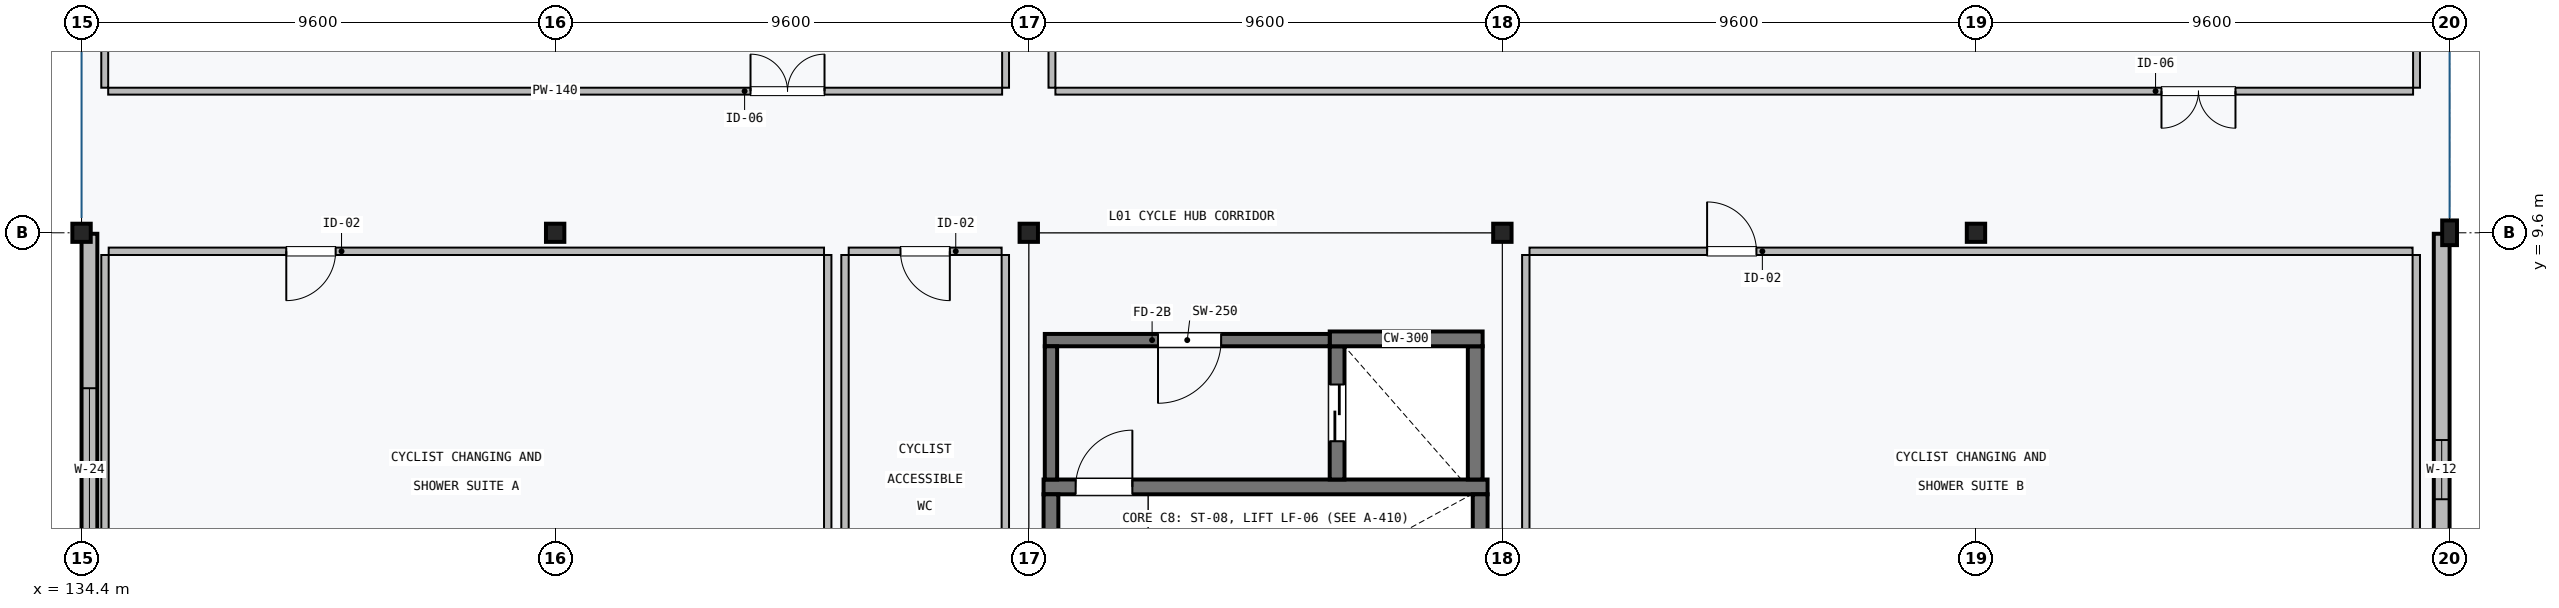
"""IFC4 building model, lengths in metres.
Left out: names, types, materials, properties, quantities, classifications, styles, units other than length and angle.
Written with IfcOpenShell. Run it as: python <this file> out.ifc"""

import sys

from ifc_helpers import new_model, si_unit, direction, frame, frame_2d, origin, origin_2d, place, context, subcontext, project, spatial, rectangle, i_section, extrude, element, fill, save


model = new_model("IFC4")
c1 = context("Model", 3, precision=1e-05, world=origin(), true_north=direction((0.0, 1.0)))
c2 = subcontext(c1, "Body", "Model", "MODEL_VIEW")
j1 = project(units=[si_unit("LENGTHUNIT", "METRE"), si_unit("PLANEANGLEUNIT", "RADIAN")], contexts=[c1])
p1 = place(None, origin())
s1 = spatial("IfcSite", under=j1, at=p1, CompositionType="ELEMENT")
p2 = place(p1, origin())
s2 = spatial("IfcBuilding", under=s1, at=p2, CompositionType="ELEMENT")
p3 = place(p2, frame((0.0, 0.0, 6.0)))
s3 = spatial("IfcBuildingStorey", under=s2, at=p3, CompositionType="ELEMENT", Elevation=6.0)
for number, where, z_axis, x_axis in (
    (1, (134.4, 9.6, 0.0), (0.0, 0.0, 1.0), (1.0, 0.0, 0.0)),
    (2, (144.0, 9.6, 0.0), (0.0, 0.0, 1.0), (1.0, 0.0, 0.0)),
    (3, (153.6, 9.6, 0.0), (0.0, 0.0, 1.0), (1.0, 0.0, 0.0)),
    (4, (163.2, 9.6, 0.0), (0.0, 0.0, 1.0), (1.0, 0.0, 0.0)),
    (5, (172.8, 9.6, 0.0), (0.0, 0.0, 1.0), (1.0, 0.0, 0.0)),
):
    element("IfcColumn", number, at=place(p3, frame(where, z_axis=z_axis, x_axis=x_axis)), inside=s3, PredefinedType="COLUMN", context=c2, shape_type="SweptSolid", body=[
        extrude(i_section(OverallWidth=0.373, OverallDepth=0.368, WebThickness=0.014, FlangeThickness=0.024, FilletRadius=0.015, at=origin_2d()), origin(), (0.0, 0.0, 1.0), 4.25),
    ])
p4 = place(p3, frame((182.4, 9.6, 0.0), z_axis=(0.0, 0.0, 1.0), x_axis=(1.0, 0.0, 0.0)))
e6 = element("IfcColumn", 6, at=p4, inside=s3, PredefinedType="COLUMN", context=c2, shape_type="SweptSolid", body=[
    extrude(i_section(OverallWidth=0.3, OverallDepth=0.5, WebThickness=0.014, FlangeThickness=0.028, FilletRadius=0.027, at=origin_2d()), origin(), (0.0, 0.0, 1.0), 4.25),
])
p5 = place(p3, frame((162.9, 4.45, 0.0), z_axis=(0.0, 0.0, 1.0), x_axis=(-1.0, 0.0, 0.0)))
e7 = element("IfcWall", 7, at=p5, inside=s3, PredefinedType="SHEAR", context=c2, shape_type="SweptSolid", body=[
    extrude(rectangle(XDim=9.0, YDim=0.3, at=frame_2d((4.5, 0.0))), origin(), (0.0, 0.0, 1.0), 4.5),
])
p6 = place(p5, frame((7.2, 0.0, 0.0)))
e8 = element("IfcOpeningElement", 8, at=p6, cuts=e7, PredefinedType="OPENING", context=c2, shape_type="SweptSolid", body=[
    extrude(rectangle(XDim=1.15, YDim=2.15, at=frame_2d((0.575, 1.075))), frame((0.0, 0.16, 0.0), z_axis=(0.0, -1.0, 0.0), x_axis=(1.0, 0.0, 0.0)), (0.0, 0.0, 1.0), 0.32),
])
for number, where, z_axis, x_axis in (
    (9, (154.05, 0.72, 0.0), (0.0, 0.0, 1.0), (0.0, 1.0, 0.0)),
    (10, (162.75, 4.3, 0.0), (0.0, 0.0, 1.0), (0.0, -1.0, 0.0)),
):
    element("IfcWall", number, at=place(p3, frame(where, z_axis=z_axis, x_axis=x_axis)), inside=s3, PredefinedType="SHEAR", context=c2, shape_type="SweptSolid", body=[
        extrude(rectangle(XDim=3.58, YDim=0.3, at=frame_2d((1.79, 0.0))), origin(), (0.0, 0.0, 1.0), 4.25),
    ])
p7 = place(p3, frame((159.85, 7.3, 0.0), z_axis=(0.0, 0.0, 1.0), x_axis=(0.0, -1.0, 0.0)))
e11 = element("IfcWall", 11, at=p7, inside=s3, PredefinedType="SHEAR", context=c2, shape_type="SweptSolid", body=[
    extrude(rectangle(XDim=2.7, YDim=0.3, at=frame_2d((1.35, 0.0))), origin(), (0.0, 0.0, 1.0), 4.5),
])
p8 = place(p7, frame((0.775, 0.0, 0.0)))
e12 = element("IfcOpeningElement", 12, at=p8, cuts=e11, PredefinedType="OPENING", context=c2, shape_type="SweptSolid", body=[
    extrude(rectangle(XDim=1.15, YDim=2.1, at=frame_2d((0.575, 1.05))), frame((0.0, 0.16, 0.0), z_axis=(0.0, -1.0, 0.0), x_axis=(1.0, 0.0, 0.0)), (0.0, 0.0, 1.0), 0.32),
])
p9 = place(p3, frame((162.65, 4.6, 0.0), z_axis=(0.0, 0.0, 1.0), x_axis=(0.0, 1.0, 0.0)))
e13 = element("IfcWall", 13, at=p9, inside=s3, PredefinedType="SHEAR", context=c2, shape_type="SweptSolid", body=[
    extrude(rectangle(XDim=2.7, YDim=0.3, at=frame_2d((1.35, 0.0))), origin(), (0.0, 0.0, 1.0), 4.5),
])
p10 = place(p3, frame((159.7, 7.45, 0.0), z_axis=(0.0, 0.0, 1.0), x_axis=(1.0, 0.0, 0.0)))
e14 = element("IfcWall", 14, at=p10, inside=s3, PredefinedType="SHEAR", context=c2, shape_type="SweptSolid", body=[
    extrude(rectangle(XDim=3.1, YDim=0.3, at=frame_2d((1.55, 0.0))), origin(), (0.0, 0.0, 1.0), 4.5),
])
p11 = place(p3, frame((159.7, 7.425, 0.0), z_axis=(0.0, 0.0, 1.0), x_axis=(-1.0, 0.0, 0.0)))
e15 = element("IfcWall", 15, at=p11, inside=s3, PredefinedType="SHEAR", context=c2, shape_type="SweptSolid", body=[
    extrude(rectangle(XDim=5.775, YDim=0.25, at=frame_2d((2.887, 0.0))), origin(), (0.0, 0.0, 1.0), 4.25),
])
p12 = place(p11, frame((2.2, 0.0, 0.0)))
e16 = element("IfcOpeningElement", 16, at=p12, cuts=e15, PredefinedType="OPENING", context=c2, shape_type="SweptSolid", body=[
    extrude(rectangle(XDim=1.28, YDim=2.2, at=frame_2d((0.64, 1.1))), frame((0.0, 0.135, 0.0), z_axis=(0.0, -1.0, 0.0), x_axis=(1.0, 0.0, 0.0)), (0.0, 0.0, 1.0), 0.27),
])
p13 = place(p3, frame((154.05, 4.6, 0.0), z_axis=(0.0, 0.0, 1.0), x_axis=(0.0, 1.0, 0.0)))
e17 = element("IfcWall", 17, at=p13, inside=s3, PredefinedType="SHEAR", context=c2, shape_type="SweptSolid", body=[
    extrude(rectangle(XDim=2.7, YDim=0.25, at=frame_2d((1.35, 0.0))), origin(), (0.0, 0.0, 1.0), 4.25),
])
p14 = place(p3, frame((134.56, 0.02, 0.0), z_axis=(0.0, 0.0, 1.0), x_axis=(0.0, 1.0, 0.0)))
e18 = element("IfcWall", 18, at=p14, inside=s3, PredefinedType="SOLIDWALL", context=c2, shape_type="SweptSolid", body=[
    extrude(rectangle(XDim=9.56, YDim=0.32, at=frame_2d((4.78, 0.0))), origin(), (0.0, 0.0, 1.0), 3.717),
])
p15 = place(p14, frame((3.13, 0.0, 0.9)))
e19 = element("IfcOpeningElement", 19, at=p15, cuts=e18, PredefinedType="OPENING", context=c2, shape_type="SweptSolid", body=[
    extrude(rectangle(XDim=3.3, YDim=1.5, at=frame_2d((1.65, 0.75))), frame((0.0, 0.17, 0.0), z_axis=(0.0, -1.0, 0.0), x_axis=(1.0, 0.0, 0.0)), (0.0, 0.0, 1.0), 0.34),
])
p16 = place(p3, frame((182.24, 9.58, 0.0), z_axis=(0.0, 0.0, 1.0), x_axis=(0.0, -1.0, 0.0)))
e20 = element("IfcWall", 20, at=p16, inside=s3, PredefinedType="SOLIDWALL", context=c2, shape_type="SweptSolid", body=[
    extrude(rectangle(XDim=9.56, YDim=0.32, at=frame_2d((4.78, 0.0))), origin(), (0.0, 0.0, 1.0), 3.717),
])
p17 = place(p16, frame((4.18, 0.0, 0.9)))
e21 = element("IfcOpeningElement", 21, at=p17, cuts=e20, PredefinedType="OPENING", context=c2, shape_type="SweptSolid", body=[
    extrude(rectangle(XDim=1.2, YDim=1.8, at=frame_2d((0.6, 0.9))), frame((0.0, 0.17, 0.0), z_axis=(0.0, -1.0, 0.0), x_axis=(1.0, 0.0, 0.0)), (0.0, 0.0, 1.0), 0.34),
])
p18 = place(p3, frame((153.06, 12.47, 0.0), z_axis=(0.0, 0.0, 1.0), x_axis=(-1.0, 0.0, 0.0)))
e22 = element("IfcWall", 22, at=p18, inside=s3, PredefinedType="PARTITIONING", context=c2, shape_type="SweptSolid", body=[
    extrude(rectangle(XDim=18.12, YDim=0.14, at=frame_2d((9.06, 0.0))), origin(), (0.0, 0.0, 1.0), 3.707),
])
p19 = place(p18, frame((3.6, 0.0, 0.0)))
e23 = element("IfcOpeningElement", 23, at=p19, cuts=e22, PredefinedType="OPENING", context=c2, shape_type="SweptSolid", body=[
    extrude(rectangle(XDim=1.5, YDim=2.25, at=frame_2d((0.75, 1.125))), frame((0.0, 0.08, 0.0), z_axis=(0.0, -1.0, 0.0), x_axis=(1.0, 0.0, 0.0)), (0.0, 0.0, 1.0), 0.16),
])
for number, where, z_axis, x_axis in (
    (24, (134.87, 12.54, 0.0), (0.0, 0.0, 1.0), (0.0, 1.0, 0.0)),
    (25, (153.13, 18.76, 0.0), (0.0, 0.0, 1.0), (0.0, -1.0, 0.0)),
):
    element("IfcWall", number, at=place(p3, frame(where, z_axis=z_axis, x_axis=x_axis)), inside=s3, PredefinedType="PARTITIONING", context=c2, shape_type="SweptSolid", body=[
        extrude(rectangle(XDim=6.22, YDim=0.14, at=frame_2d((3.11, 0.0))), origin(), (0.0, 0.0, 1.0), 3.89),
    ])
p20 = place(p3, frame((134.95, 9.225, 0.0), z_axis=(0.0, 0.0, 1.0), x_axis=(1.0, 0.0, 0.0)))
e26 = element("IfcWall", 26, at=p20, inside=s3, PredefinedType="PLUMBINGWALL", context=c2, shape_type="SweptSolid", body=[
    extrude(rectangle(XDim=14.5, YDim=0.15, at=frame_2d((7.25, 0.0))), origin(), (0.0, 0.0, 1.0), 3.707),
])
p21 = place(p20, frame((3.6, 0.0, 0.0)))
e27 = element("IfcOpeningElement", 27, at=p21, cuts=e26, PredefinedType="OPENING", context=c2, shape_type="SweptSolid", body=[
    extrude(rectangle(XDim=1.0, YDim=2.15, at=frame_2d((0.5, 1.075))), frame((0.0, 0.085, 0.0), z_axis=(0.0, -1.0, 0.0), x_axis=(1.0, 0.0, 0.0)), (0.0, 0.0, 1.0), 0.17),
])
for number, where, z_axis, x_axis in (
    (28, (134.875, 0.65, 0.0), (0.0, 0.0, 1.0), (0.0, 1.0, 0.0)),
    (29, (149.525, 9.15, 0.0), (0.0, 0.0, 1.0), (0.0, -1.0, 0.0)),
):
    element("IfcWall", number, at=place(p3, frame(where, z_axis=z_axis, x_axis=x_axis)), inside=s3, PredefinedType="PLUMBINGWALL", context=c2, shape_type="SweptSolid", body=[
        extrude(rectangle(XDim=8.5, YDim=0.15, at=frame_2d((4.25, 0.0))), origin(), (0.0, 0.0, 1.0), 3.89),
    ])
p22 = place(p3, frame((149.95, 9.225, 0.0), z_axis=(0.0, 0.0, 1.0), x_axis=(1.0, 0.0, 0.0)))
e30 = element("IfcWall", 30, at=p22, inside=s3, PredefinedType="PLUMBINGWALL", context=c2, shape_type="SweptSolid", body=[
    extrude(rectangle(XDim=3.1, YDim=0.15, at=frame_2d((1.55, 0.0))), origin(), (0.0, 0.0, 1.0), 3.89),
])
p23 = place(p22, frame((1.05, 0.0, 0.0)))
e31 = element("IfcOpeningElement", 31, at=p23, cuts=e30, PredefinedType="OPENING", context=c2, shape_type="SweptSolid", body=[
    extrude(rectangle(XDim=1.0, YDim=2.15, at=frame_2d((0.5, 1.075))), frame((0.0, 0.085, 0.0), z_axis=(0.0, -1.0, 0.0), x_axis=(1.0, 0.0, 0.0)), (0.0, 0.0, 1.0), 0.17),
])
for number, where, z_axis, x_axis in (
    (32, (149.875, 0.65, 0.0), (0.0, 0.0, 1.0), (0.0, 1.0, 0.0)),
    (33, (153.125, 9.15, 0.0), (0.0, 0.0, 1.0), (0.0, -1.0, 0.0)),
):
    element("IfcWall", number, at=place(p3, frame(where, z_axis=z_axis, x_axis=x_axis)), inside=s3, PredefinedType="PLUMBINGWALL", context=c2, shape_type="SweptSolid", body=[
        extrude(rectangle(XDim=8.5, YDim=0.15, at=frame_2d((4.25, 0.0))), origin(), (0.0, 0.0, 1.0), 3.89),
    ])
p24 = place(p3, frame((163.75, 9.225, 0.0), z_axis=(0.0, 0.0, 1.0), x_axis=(1.0, 0.0, 0.0)))
e34 = element("IfcWall", 34, at=p24, inside=s3, PredefinedType="PLUMBINGWALL", context=c2, shape_type="SweptSolid", body=[
    extrude(rectangle(XDim=17.9, YDim=0.15, at=frame_2d((8.95, 0.0))), origin(), (0.0, 0.0, 1.0), 3.707),
])
p25 = place(p24, frame((3.6, 0.0, 0.0)))
e35 = element("IfcOpeningElement", 35, at=p25, cuts=e34, PredefinedType="OPENING", context=c2, shape_type="SweptSolid", body=[
    extrude(rectangle(XDim=1.0, YDim=2.15, at=frame_2d((0.5, 1.075))), frame((0.0, 0.085, 0.0), z_axis=(0.0, -1.0, 0.0), x_axis=(1.0, 0.0, 0.0)), (0.0, 0.0, 1.0), 0.17),
])
for number, where, z_axis, x_axis in (
    (36, (163.675, 0.65, 0.0), (0.0, 0.0, 1.0), (0.0, 1.0, 0.0)),
    (37, (181.725, 9.15, 0.0), (0.0, 0.0, 1.0), (0.0, -1.0, 0.0)),
):
    element("IfcWall", number, at=place(p3, frame(where, z_axis=z_axis, x_axis=x_axis)), inside=s3, PredefinedType="PLUMBINGWALL", context=c2, shape_type="SweptSolid", body=[
        extrude(rectangle(XDim=8.5, YDim=0.15, at=frame_2d((4.25, 0.0))), origin(), (0.0, 0.0, 1.0), 3.89),
    ])
p26 = place(p3, frame((181.66, 12.47, 0.0), z_axis=(0.0, 0.0, 1.0), x_axis=(-1.0, 0.0, 0.0)))
e38 = element("IfcWall", 38, at=p26, inside=s3, PredefinedType="PARTITIONING", context=c2, shape_type="SweptSolid", body=[
    extrude(rectangle(XDim=27.52, YDim=0.14, at=frame_2d((13.76, 0.0))), origin(), (0.0, 0.0, 1.0), 3.707),
])
p27 = place(p26, frame((3.6, 0.0, 0.0)))
e39 = element("IfcOpeningElement", 39, at=p27, cuts=e38, PredefinedType="OPENING", context=c2, shape_type="SweptSolid", body=[
    extrude(rectangle(XDim=1.5, YDim=2.25, at=frame_2d((0.75, 1.125))), frame((0.0, 0.08, 0.0), z_axis=(0.0, -1.0, 0.0), x_axis=(1.0, 0.0, 0.0)), (0.0, 0.0, 1.0), 0.16),
])
for number, where, z_axis, x_axis in (
    (40, (154.07, 12.54, 0.0), (0.0, 0.0, 1.0), (0.0, 1.0, 0.0)),
    (41, (181.73, 28.26, 0.0), (0.0, 0.0, 1.0), (0.0, -1.0, 0.0)),
):
    element("IfcWall", number, at=place(p3, frame(where, z_axis=z_axis, x_axis=x_axis)), inside=s3, PredefinedType="PARTITIONING", context=c2, shape_type="SweptSolid", body=[
        extrude(rectangle(XDim=15.72, YDim=0.14, at=frame_2d((7.86, 0.0))), origin(), (0.0, 0.0, 1.0), 3.556),
    ])
p28 = place(p6, frame((1.15, 0.0, 0.0), z_axis=(0.0, 0.0, 1.0), x_axis=(-1.0, 0.0, 0.0)))
e42 = element("IfcDoor", 42, at=p28, inside=s3, OperationType="SINGLE_SWING_LEFT", PredefinedType="DOOR", context=c2, shape_type="SweptSolid", body=[
    extrude(rectangle(XDim=1.15, YDim=2.15, at=frame_2d((0.575, 1.075))), frame((0.0, 0.025, 0.0), z_axis=(0.0, -1.0, 0.0), x_axis=(1.0, 0.0, 0.0)), (0.0, 0.0, 1.0), 0.05),
])
fill(e8, e42)
p29 = place(p8, frame((1.15, 0.0, 0.0), z_axis=(0.0, 0.0, 1.0), x_axis=(-1.0, 0.0, 0.0)))
e43 = element("IfcDoor", 43, at=p29, inside=s3, OperationType="DOUBLE_DOOR_SLIDING", PredefinedType="DOOR", context=c2, shape_type="SweptSolid", body=[
    extrude(rectangle(XDim=1.15, YDim=2.1, at=frame_2d((0.575, 1.05))), frame((0.0, 0.025, 0.0), z_axis=(0.0, -1.0, 0.0), x_axis=(1.0, 0.0, 0.0)), (0.0, 0.0, 1.0), 0.05),
])
fill(e12, e43)
p30 = place(p12, origin())
e44 = element("IfcDoor", 44, at=p30, inside=s3, OperationType="SINGLE_SWING_RIGHT", PredefinedType="DOOR", context=c2, shape_type="SweptSolid", body=[
    extrude(rectangle(XDim=1.28, YDim=2.2, at=frame_2d((0.64, 1.1))), frame((0.0, 0.025, 0.0), z_axis=(0.0, -1.0, 0.0), x_axis=(1.0, 0.0, 0.0)), (0.0, 0.0, 1.0), 0.05),
])
fill(e16, e44)
p31 = place(p15, origin())
e45 = element("IfcWindow", 45, at=p31, inside=s3, PartitioningType="SINGLE_PANEL", PredefinedType="WINDOW", context=c2, shape_type="SweptSolid", body=[
    extrude(rectangle(XDim=3.3, YDim=1.5, at=frame_2d((1.65, 0.75))), frame((0.0, 0.03, 0.0), z_axis=(0.0, -1.0, 0.0), x_axis=(1.0, 0.0, 0.0)), (0.0, 0.0, 1.0), 0.06),
])
fill(e19, e45)
p32 = place(p17, origin())
e46 = element("IfcWindow", 46, at=p32, inside=s3, PartitioningType="SINGLE_PANEL", PredefinedType="WINDOW", context=c2, shape_type="SweptSolid", body=[
    extrude(rectangle(XDim=1.2, YDim=1.8, at=frame_2d((0.6, 0.9))), frame((0.0, 0.03, 0.0), z_axis=(0.0, -1.0, 0.0), x_axis=(1.0, 0.0, 0.0)), (0.0, 0.0, 1.0), 0.06),
])
fill(e21, e46)
p33 = place(p19, frame((1.5, 0.0, 0.0), z_axis=(0.0, 0.0, 1.0), x_axis=(-1.0, 0.0, 0.0)))
e47 = element("IfcDoor", 47, at=p33, inside=s3, OperationType="DOUBLE_DOOR_SINGLE_SWING", PredefinedType="DOOR", context=c2, shape_type="SweptSolid", body=[
    extrude(rectangle(XDim=1.5, YDim=2.25, at=frame_2d((0.75, 1.125))), frame((0.0, 0.025, 0.0), z_axis=(0.0, -1.0, 0.0), x_axis=(1.0, 0.0, 0.0)), (0.0, 0.0, 1.0), 0.05),
])
fill(e23, e47)
p34 = place(p21, frame((1.0, 0.0, 0.0), z_axis=(0.0, 0.0, 1.0), x_axis=(-1.0, 0.0, 0.0)))
e48 = element("IfcDoor", 48, at=p34, inside=s3, OperationType="SINGLE_SWING_LEFT", PredefinedType="DOOR", context=c2, shape_type="SweptSolid", body=[
    extrude(rectangle(XDim=1.0, YDim=2.15, at=frame_2d((0.5, 1.075))), frame((0.0, 0.025, 0.0), z_axis=(0.0, -1.0, 0.0), x_axis=(1.0, 0.0, 0.0)), (0.0, 0.0, 1.0), 0.05),
])
fill(e27, e48)
p35 = place(p23, frame((1.0, 0.0, 0.0), z_axis=(0.0, 0.0, 1.0), x_axis=(-1.0, 0.0, 0.0)))
e49 = element("IfcDoor", 49, at=p35, inside=s3, OperationType="SINGLE_SWING_RIGHT", PredefinedType="DOOR", context=c2, shape_type="SweptSolid", body=[
    extrude(rectangle(XDim=1.0, YDim=2.15, at=frame_2d((0.5, 1.075))), frame((0.0, 0.025, 0.0), z_axis=(0.0, -1.0, 0.0), x_axis=(1.0, 0.0, 0.0)), (0.0, 0.0, 1.0), 0.05),
])
fill(e31, e49)
p36 = place(p25, origin())
e50 = element("IfcDoor", 50, at=p36, inside=s3, OperationType="SINGLE_SWING_LEFT", PredefinedType="DOOR", context=c2, shape_type="SweptSolid", body=[
    extrude(rectangle(XDim=1.0, YDim=2.15, at=frame_2d((0.5, 1.075))), frame((0.0, 0.025, 0.0), z_axis=(0.0, -1.0, 0.0), x_axis=(1.0, 0.0, 0.0)), (0.0, 0.0, 1.0), 0.05),
])
fill(e35, e50)
p37 = place(p27, origin())
e51 = element("IfcDoor", 51, at=p37, inside=s3, OperationType="DOUBLE_DOOR_SINGLE_SWING", PredefinedType="DOOR", context=c2, shape_type="SweptSolid", body=[
    extrude(rectangle(XDim=1.5, YDim=2.25, at=frame_2d((0.75, 1.125))), frame((0.0, 0.025, 0.0), z_axis=(0.0, -1.0, 0.0), x_axis=(1.0, 0.0, 0.0)), (0.0, 0.0, 1.0), 0.05),
])
fill(e39, e51)
save(model, sys.argv[1])
